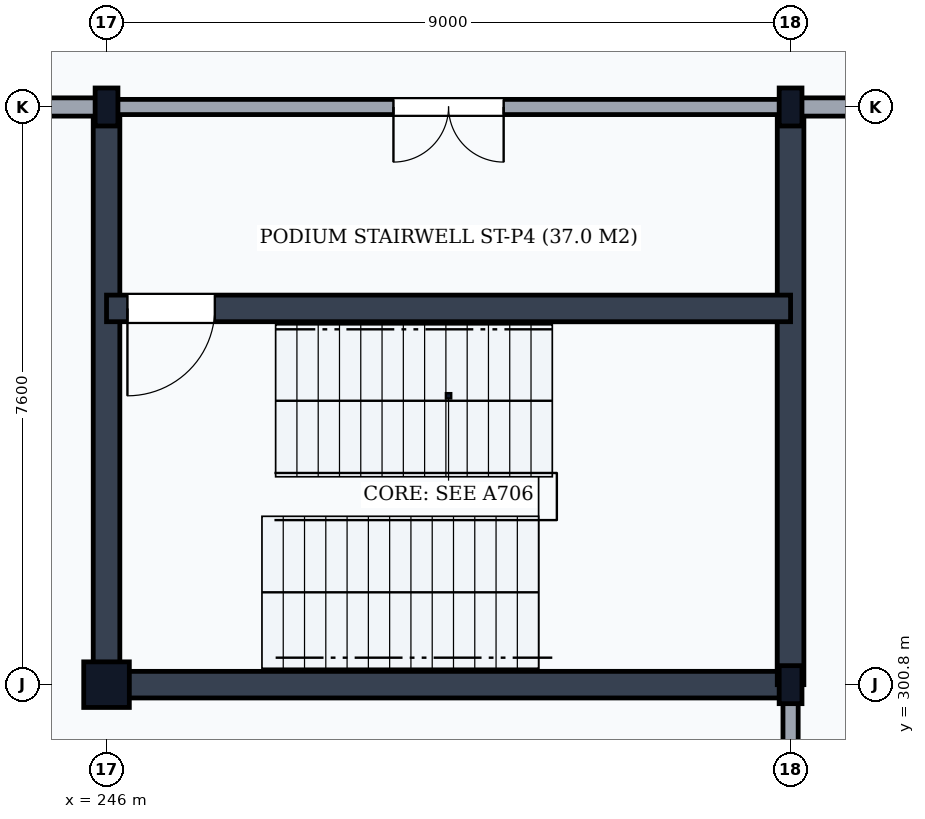
"""IFC4 building model, lengths in metres.
Left out: names, types, materials, properties, quantities, classifications, styles, units other than length and angle.
Written with IfcOpenShell. Run it as: python <this file> out.ifc"""

import sys

from ifc_helpers import new_model, si_unit, direction, frame, frame_2d, origin, origin_2d, place, context, subcontext, project, spatial, rectangle, i_section, extrude, element, fill, save


model = new_model("IFC4")
c1 = context("Model", 3, precision=1e-05, world=origin(), true_north=direction((0.0, 1.0)))
c2 = subcontext(c1, "Body", "Model", "MODEL_VIEW")
j1 = project(units=[si_unit("LENGTHUNIT", "METRE"), si_unit("PLANEANGLEUNIT", "RADIAN")], contexts=[c1])
p1 = place(None, origin())
s1 = spatial("IfcSite", under=j1, at=p1, CompositionType="ELEMENT")
p2 = place(p1, origin())
s2 = spatial("IfcBuilding", under=s1, at=p2, CompositionType="ELEMENT")
p3 = place(p2, frame((0.0, 0.0, -4.8)))
s3 = spatial("IfcBuildingStorey", under=s2, at=p3, CompositionType="ELEMENT", Elevation=-4.8)
p4 = place(p3, frame((246.0, 300.8, 0.0), z_axis=(0.0, 0.0, 1.0), x_axis=(1.0, 0.0, 0.0)))
e1 = element("IfcColumn", 1, at=p4, inside=s3, PredefinedType="COLUMN", context=c2, shape_type="SweptSolid", body=[
    extrude(rectangle(XDim=0.6, YDim=0.6, at=origin_2d()), origin(), (0.0, 0.0, 1.0), 4.8),
])
for number, where, z_axis, x_axis in (
    (2, (246.0, 308.4, 0.0), (0.0, 0.0, 1.0), (1.0, 0.0, 0.0)),
    (3, (255.0, 300.8, 0.0), (0.0, 0.0, 1.0), (1.0, 0.0, 0.0)),
    (4, (255.0, 308.4, 0.0), (0.0, 0.0, 1.0), (1.0, 0.0, 0.0)),
):
    element("IfcColumn", number, at=place(p3, frame(where, z_axis=z_axis, x_axis=x_axis)), inside=s3, PredefinedType="COLUMN", context=c2, shape_type="SweptSolid", body=[
        extrude(i_section(OverallWidth=0.3, OverallDepth=0.5, WebThickness=0.014, FlangeThickness=0.028, FilletRadius=0.027, at=origin_2d()), origin(), (0.0, 0.0, 1.0), 4.8),
    ])
p5 = place(p3, frame((246.0, 300.8, 0.0), z_axis=(0.0, 0.0, 1.0), x_axis=(1.0, 0.0, 0.0)))
e5 = element("IfcWall", 5, at=p5, inside=s3, PredefinedType="SHEAR", context=c2, shape_type="SweptSolid", body=[
    extrude(rectangle(XDim=9.0, YDim=0.35, at=frame_2d((4.5, 0.0))), origin(), (0.0, 0.0, 1.0), 4.51),
])
for number, where, z_axis, x_axis in (
    (6, (246.0, 300.8, 0.0), (0.0, 0.0, 1.0), (0.0, 1.0, 0.0)),
    (7, (255.0, 300.8, 0.0), (0.0, 0.0, 1.0), (0.0, 1.0, 0.0)),
):
    element("IfcWall", number, at=place(p3, frame(where, z_axis=z_axis, x_axis=x_axis)), inside=s3, PredefinedType="SHEAR", context=c2, shape_type="SweptSolid", body=[
        extrude(rectangle(XDim=7.6, YDim=0.35, at=frame_2d((3.8, 0.0))), origin(), (0.0, 0.0, 1.0), 4.51),
    ])
p6 = place(p3, frame((246.0, 305.75, 0.0), z_axis=(0.0, 0.0, 1.0), x_axis=(1.0, 0.0, 0.0)))
e8 = element("IfcWall", 8, at=p6, inside=s3, PredefinedType="SHEAR", context=c2, shape_type="SweptSolid", body=[
    extrude(rectangle(XDim=9.0, YDim=0.35, at=frame_2d((4.5, 0.0))), origin(), (0.0, 0.0, 1.0), 4.51),
])
p7 = place(p6, frame((0.275, 0.0, 0.0)))
e9 = element("IfcOpeningElement", 9, at=p7, cuts=e8, PredefinedType="OPENING", context=c2, shape_type="SweptSolid", body=[
    extrude(rectangle(XDim=1.15, YDim=2.15, at=frame_2d((0.575, 1.075))), frame((0.0, 0.19, 0.0), z_axis=(0.0, -1.0, 0.0), x_axis=(1.0, 0.0, 0.0)), (0.0, 0.0, 1.0), 0.38),
])
p8 = place(p3, frame((246.0, 308.4, 0.0), z_axis=(0.0, 0.0, 1.0), x_axis=(1.0, 0.0, 0.0)))
e10 = element("IfcWall", 10, at=p8, inside=s3, PredefinedType="PARTITIONING", context=c2, shape_type="SweptSolid", body=[
    extrude(rectangle(XDim=9.0, YDim=0.2, at=frame_2d((4.5, 0.0))), origin(), (0.0, 0.0, 1.0), 3.808),
])
p9 = place(p8, frame((3.775, 0.0, 0.0)))
e11 = element("IfcOpeningElement", 11, at=p9, cuts=e10, PredefinedType="OPENING", context=c2, shape_type="SweptSolid", body=[
    extrude(rectangle(XDim=1.45, YDim=2.2, at=frame_2d((0.725, 1.1))), frame((0.0, 0.115, 0.0), z_axis=(0.0, -1.0, 0.0), x_axis=(1.0, 0.0, 0.0)), (0.0, 0.0, 1.0), 0.23),
])
p10 = place(p3, frame((255.0, 258.2, 0.0), z_axis=(0.0, 0.0, 1.0), x_axis=(0.0, 1.0, 0.0)))
e12 = element("IfcWall", 12, at=p10, inside=s3, PredefinedType="PARTITIONING", context=c2, shape_type="SweptSolid", body=[
    extrude(rectangle(XDim=42.6, YDim=0.2, at=frame_2d((21.3, 0.0))), origin(), (0.0, 0.0, 1.0), 3.908),
])
p11 = place(p3, frame((205.0, 308.4, 0.0), z_axis=(0.0, 0.0, 1.0), x_axis=(1.0, 0.0, 0.0)))
e13 = element("IfcWall", 13, at=p11, inside=s3, PredefinedType="PARTITIONING", context=c2, shape_type="SweptSolid", body=[
    extrude(rectangle(XDim=41.0, YDim=0.24, at=frame_2d((20.5, 0.0))), origin(), (0.0, 0.0, 1.0), 3.808),
])
p12 = place(p3, frame((255.0, 308.4, 0.0), z_axis=(0.0, 0.0, 1.0), x_axis=(1.0, 0.0, 0.0)))
e14 = element("IfcWall", 14, at=p12, inside=s3, PredefinedType="PARTITIONING", context=c2, shape_type="SweptSolid", body=[
    extrude(rectangle(XDim=33.0, YDim=0.24, at=frame_2d((16.5, 0.0))), origin(), (0.0, 0.0, 1.0), 3.808),
])
p13 = place(p12, frame((14.25, 0.0, 0.0)))
e15 = element("IfcOpeningElement", 15, at=p13, cuts=e14, PredefinedType="OPENING", context=c2, shape_type="SweptSolid", body=[
    extrude(rectangle(XDim=1.5, YDim=2.1, at=frame_2d((0.75, 1.05))), frame((0.0, 0.135, 0.0), z_axis=(0.0, -1.0, 0.0), x_axis=(1.0, 0.0, 0.0)), (0.0, 0.0, 1.0), 0.27),
])
p14 = place(p7, frame((1.15, 0.0, 0.0), z_axis=(0.0, 0.0, 1.0), x_axis=(-1.0, 0.0, 0.0)))
e16 = element("IfcDoor", 16, at=p14, inside=s3, OperationType="SINGLE_SWING_RIGHT", PredefinedType="DOOR", context=c2, shape_type="SweptSolid", body=[
    extrude(rectangle(XDim=1.15, YDim=2.15, at=frame_2d((0.575, 1.075))), frame((0.0, 0.025, 0.0), z_axis=(0.0, -1.0, 0.0), x_axis=(1.0, 0.0, 0.0)), (0.0, 0.0, 1.0), 0.05),
])
fill(e9, e16)
p15 = place(p9, frame((1.45, 0.0, 0.0), z_axis=(0.0, 0.0, 1.0), x_axis=(-1.0, 0.0, 0.0)))
e17 = element("IfcDoor", 17, at=p15, inside=s3, OperationType="DOUBLE_DOOR_SINGLE_SWING", PredefinedType="DOOR", context=c2, shape_type="SweptSolid", body=[
    extrude(rectangle(XDim=1.45, YDim=2.2, at=frame_2d((0.725, 1.1))), frame((0.0, 0.025, 0.0), z_axis=(0.0, -1.0, 0.0), x_axis=(1.0, 0.0, 0.0)), (0.0, 0.0, 1.0), 0.05),
])
fill(e11, e17)
save(model, sys.argv[1])
